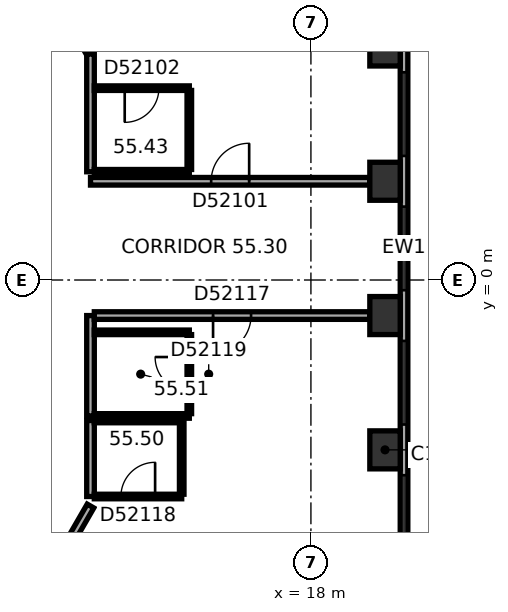
"""IFC4 building model, lengths in metres.
Left out: names, types, materials, properties, quantities, classifications, styles, units other than length and angle.
Written with IfcOpenShell. Run it as: python <this file> out.ifc"""

import sys

from ifc_helpers import new_model, si_unit, direction, frame, frame_2d, origin, origin_2d, place, context, subcontext, project, spatial, rectangle, extrude, element, fill, save


model = new_model("IFC4")
c1 = context("Model", 3, precision=1e-05, world=origin(), true_north=direction((0.0, 1.0)))
c2 = subcontext(c1, "Body", "Model", "MODEL_VIEW")
j1 = project(units=[si_unit("LENGTHUNIT", "METRE"), si_unit("PLANEANGLEUNIT", "RADIAN")], contexts=[c1])
p1 = place(None, origin())
s1 = spatial("IfcSite", under=j1, at=p1, CompositionType="ELEMENT")
p2 = place(p1, origin())
s2 = spatial("IfcBuilding", under=s1, at=p2, CompositionType="ELEMENT")
p3 = place(p2, frame((0.0, 0.0, 225.4)))
s3 = spatial("IfcBuildingStorey", under=s2, at=p3, CompositionType="ELEMENT", Elevation=225.4)
for number, where, z_axis, x_axis in (
    (1, (19.95, -4.469, 0.0), (0.0, 0.0, 1.0), (0.0, 1.0, 0.0)),
    (2, (19.95, -0.936, 0.0), (0.0, 0.0, 1.0), (0.0, 1.0, 0.0)),
    (3, (19.95, 2.598, 0.0), (0.0, 0.0, 1.0), (0.0, 1.0, 0.0)),
    (4, (19.95, 6.132, 0.0), (0.0, 0.0, 1.0), (0.0, 1.0, 0.0)),
):
    element("IfcColumn", number, at=place(p3, frame(where, z_axis=z_axis, x_axis=x_axis)), inside=s3, PredefinedType="COLUMN", context=c2, shape_type="SweptSolid", body=[
        extrude(rectangle(XDim=1.0, YDim=0.8, at=origin_2d()), origin(), (0.0, 0.0, 1.0), 3.7),
    ])
p4 = place(p3, frame((20.45, -8.59, 0.0), z_axis=(0.0, 0.0, 1.0), x_axis=(0.0, 1.0, 0.0)))
e5 = element("IfcWall", 5, at=p4, inside=s3, PredefinedType="STANDARD", context=c2, shape_type="SweptSolid", body=[
    extrude(rectangle(XDim=18.841, YDim=0.2, at=frame_2d((9.421, 0.0))), origin(), (0.0, 0.0, 1.0), 3.7),
])
p5 = place(p4, frame((1.254, 0.0, 0.9)))
e6 = element("IfcOpeningElement", 6, at=p5, cuts=e5, PredefinedType="OPENING", context=c2, shape_type="SweptSolid", body=[
    extrude(rectangle(XDim=2.2, YDim=2.0, at=frame_2d((1.1, 1.0))), frame((0.0, 0.11, 0.0), z_axis=(0.0, -1.0, 0.0), x_axis=(1.0, 0.0, 0.0)), (0.0, 0.0, 1.0), 0.22),
])
p6 = place(p4, frame((4.788, 0.0, 0.9)))
e7 = element("IfcOpeningElement", 7, at=p6, cuts=e5, PredefinedType="OPENING", context=c2, shape_type="SweptSolid", body=[
    extrude(rectangle(XDim=2.2, YDim=2.0, at=frame_2d((1.1, 1.0))), frame((0.0, 0.11, 0.0), z_axis=(0.0, -1.0, 0.0), x_axis=(1.0, 0.0, 0.0)), (0.0, 0.0, 1.0), 0.22),
])
p7 = place(p4, frame((8.322, 0.0, 0.9)))
e8 = element("IfcOpeningElement", 8, at=p7, cuts=e5, PredefinedType="OPENING", context=c2, shape_type="SweptSolid", body=[
    extrude(rectangle(XDim=2.2, YDim=2.0, at=frame_2d((1.1, 1.0))), frame((0.0, 0.11, 0.0), z_axis=(0.0, -1.0, 0.0), x_axis=(1.0, 0.0, 0.0)), (0.0, 0.0, 1.0), 0.22),
])
p8 = place(p4, frame((11.855, 0.0, 0.9)))
e9 = element("IfcOpeningElement", 9, at=p8, cuts=e5, PredefinedType="OPENING", context=c2, shape_type="SweptSolid", body=[
    extrude(rectangle(XDim=2.2, YDim=2.0, at=frame_2d((1.1, 1.0))), frame((0.0, 0.11, 0.0), z_axis=(0.0, -1.0, 0.0), x_axis=(1.0, 0.0, 0.0)), (0.0, 0.0, 1.0), 0.22),
])
p9 = place(p4, frame((15.389, 0.0, 0.9)))
e10 = element("IfcOpeningElement", 10, at=p9, cuts=e5, PredefinedType="OPENING", context=c2, shape_type="SweptSolid", body=[
    extrude(rectangle(XDim=2.2, YDim=2.0, at=frame_2d((1.1, 1.0))), frame((0.0, 0.11, 0.0), z_axis=(0.0, -1.0, 0.0), x_axis=(1.0, 0.0, 0.0)), (0.0, 0.0, 1.0), 0.22),
])
p10 = place(p3, frame((11.27, -7.558, 0.0), z_axis=(0.0, 0.0, 1.0), x_axis=(0.499964847546, 0.866045698112, 0.0)))
e11 = element("IfcWall", 11, at=p10, inside=s3, PredefinedType="PARTITIONING", context=c2, shape_type="SweptSolid", body=[
    extrude(rectangle(XDim=1.86, YDim=0.2, at=frame_2d((0.93, 0.0))), origin(), (0.0, 0.0, 1.0), 3.42),
])
p11 = place(p3, frame((12.18, 5.981, 0.0), z_axis=(0.0, 0.0, 1.0), x_axis=(-0.499904359745, 0.86608061467, 0.0)))
e12 = element("IfcWall", 12, at=p11, inside=s3, PredefinedType="PARTITIONING", context=c2, shape_type="SweptSolid", body=[
    extrude(rectangle(XDim=1.82, YDim=0.2, at=frame_2d((0.91, 0.0))), origin(), (0.0, 0.0, 1.0), 3.42),
])
p12 = place(p3, frame((12.2, -5.697, 0.0), z_axis=(0.0, 0.0, 1.0), x_axis=(0.0, 1.0, 0.0)))
e13 = element("IfcWall", 13, at=p12, inside=s3, PredefinedType="PARTITIONING", context=c2, shape_type="SweptSolid", body=[
    extrude(rectangle(XDim=2.0, YDim=0.2, at=frame_2d((1.0, 0.0))), origin(), (0.0, 0.0, 1.0), 3.42),
])
p13 = place(p3, frame((12.2, -3.577, 0.0), z_axis=(0.0, 0.0, 1.0), x_axis=(0.0, 1.0, 0.0)))
e14 = element("IfcWall", 14, at=p13, inside=s3, PredefinedType="PARTITIONING", context=c2, shape_type="SweptSolid", body=[
    extrude(rectangle(XDim=2.641, YDim=0.2, at=frame_2d((1.321, 0.0))), origin(), (0.0, 0.0, 1.0), 3.42),
])
p14 = place(p3, frame((12.2, 2.848, 0.0), z_axis=(0.0, 0.0, 1.0), x_axis=(0.0, 1.0, 0.0)))
e15 = element("IfcWall", 15, at=p14, inside=s3, PredefinedType="PARTITIONING", context=c2, shape_type="SweptSolid", body=[
    extrude(rectangle(XDim=3.099, YDim=0.2, at=frame_2d((1.549, 0.0))), origin(), (0.0, 0.0, 1.0), 3.42),
])
p15 = place(p3, frame((12.3, -3.697, 0.0), z_axis=(0.0, 0.0, 1.0), x_axis=(1.0, 0.0, 0.0)))
e16 = element("IfcWall", 16, at=p15, inside=s3, PredefinedType="PARTITIONING", context=c2, shape_type="SweptSolid", body=[
    extrude(rectangle(XDim=2.3, YDim=0.12, at=frame_2d((1.15, 0.0))), origin(), (0.0, 0.0, 1.0), 3.42),
])
p16 = place(p3, frame((12.3, -1.377, 0.0), z_axis=(0.0, 0.0, 1.0), x_axis=(1.0, 0.0, 0.0)))
e17 = element("IfcWall", 17, at=p16, inside=s3, PredefinedType="PARTITIONING", context=c2, shape_type="SweptSolid", body=[
    extrude(rectangle(XDim=2.5, YDim=0.12, at=frame_2d((1.25, 0.0))), origin(), (0.0, 0.0, 1.0), 3.42),
])
p17 = place(p3, frame((12.3, -0.936, 0.0), z_axis=(0.0, 0.0, 1.0), x_axis=(1.0, 0.0, 0.0)))
e18 = element("IfcWall", 18, at=p17, inside=s3, PredefinedType="PARTITIONING", context=c2, shape_type="SweptSolid", body=[
    extrude(rectangle(XDim=7.25, YDim=0.2, at=frame_2d((3.625, 0.0))), origin(), (0.0, 0.0, 1.0), 2.87),
])
p18 = place(p17, frame((3.125, 0.0, 0.0)))
e19 = element("IfcOpeningElement", 19, at=p18, cuts=e18, PredefinedType="OPENING", context=c2, shape_type="SweptSolid", body=[
    extrude(rectangle(XDim=1.0, YDim=2.1, at=frame_2d((0.5, 1.05))), frame((0.0, 0.11, 0.0), z_axis=(0.0, -1.0, 0.0), x_axis=(1.0, 0.0, 0.0)), (0.0, 0.0, 1.0), 0.22),
])
p19 = place(p3, frame((12.3, 5.048, 0.0), z_axis=(0.0, 0.0, 1.0), x_axis=(1.0, 0.0, 0.0)))
e20 = element("IfcWall", 20, at=p19, inside=s3, PredefinedType="PARTITIONING", context=c2, shape_type="SweptSolid", body=[
    extrude(rectangle(XDim=2.5, YDim=0.12, at=frame_2d((1.25, 0.0))), origin(), (0.0, 0.0, 1.0), 3.42),
])
p20 = place(p19, frame((0.8, 0.0, 0.0)))
e21 = element("IfcOpeningElement", 21, at=p20, cuts=e20, PredefinedType="OPENING", context=c2, shape_type="SweptSolid", body=[
    extrude(rectangle(XDim=0.9, YDim=2.1, at=frame_2d((0.45, 1.05))), frame((0.0, 0.07, 0.0), z_axis=(0.0, -1.0, 0.0), x_axis=(1.0, 0.0, 0.0)), (0.0, 0.0, 1.0), 0.14),
])
p21 = place(p3, frame((14.6, -5.697, 0.0), z_axis=(0.0, 0.0, 1.0), x_axis=(-1.0, 0.0, 0.0)))
e22 = element("IfcWall", 22, at=p21, inside=s3, PredefinedType="PARTITIONING", context=c2, shape_type="SweptSolid", body=[
    extrude(rectangle(XDim=2.3, YDim=0.12, at=frame_2d((1.15, 0.0))), origin(), (0.0, 0.0, 1.0), 3.42),
])
p22 = place(p21, frame((0.7, 0.0, 0.0)))
e23 = element("IfcOpeningElement", 23, at=p22, cuts=e22, PredefinedType="OPENING", context=c2, shape_type="SweptSolid", body=[
    extrude(rectangle(XDim=0.9, YDim=2.1, at=frame_2d((0.45, 1.05))), frame((0.0, 0.07, 0.0), z_axis=(0.0, -1.0, 0.0), x_axis=(1.0, 0.0, 0.0)), (0.0, 0.0, 1.0), 0.14),
])
p23 = place(p3, frame((14.6, -3.757, 0.0), z_axis=(0.0, 0.0, 1.0), x_axis=(0.0, -1.0, 0.0)))
e24 = element("IfcWall", 24, at=p23, inside=s3, PredefinedType="PARTITIONING", context=c2, shape_type="SweptSolid", body=[
    extrude(rectangle(XDim=1.88, YDim=0.12, at=frame_2d((0.94, 0.0))), origin(), (0.0, 0.0, 1.0), 3.42),
])
p24 = place(p3, frame((14.8, -3.577, 0.0), z_axis=(0.0, 0.0, 1.0), x_axis=(-1.0, 0.0, 0.0)))
e25 = element("IfcWall", 25, at=p24, inside=s3, PredefinedType="PARTITIONING", context=c2, shape_type="SweptSolid", body=[
    extrude(rectangle(XDim=2.5, YDim=0.12, at=frame_2d((1.25, 0.0))), origin(), (0.0, 0.0, 1.0), 3.42),
])
p25 = place(p3, frame((14.8, -1.437, 0.0), z_axis=(0.0, 0.0, 1.0), x_axis=(0.0, -1.0, 0.0)))
e26 = element("IfcWall", 26, at=p25, inside=s3, PredefinedType="PARTITIONING", context=c2, shape_type="SweptSolid", body=[
    extrude(rectangle(XDim=2.08, YDim=0.12, at=frame_2d((1.04, 0.0))), origin(), (0.0, 0.0, 1.0), 3.42),
])
p26 = place(p25, frame((0.59, 0.0, 0.0)))
e27 = element("IfcOpeningElement", 27, at=p26, cuts=e26, PredefinedType="OPENING", context=c2, shape_type="SweptSolid", body=[
    extrude(rectangle(XDim=0.9, YDim=2.1, at=frame_2d((0.45, 1.05))), frame((0.0, 0.07, 0.0), z_axis=(0.0, -1.0, 0.0), x_axis=(1.0, 0.0, 0.0)), (0.0, 0.0, 1.0), 0.14),
])
p27 = place(p3, frame((14.8, 2.848, 0.0), z_axis=(0.0, 0.0, 1.0), x_axis=(-1.0, 0.0, 0.0)))
e28 = element("IfcWall", 28, at=p27, inside=s3, PredefinedType="PARTITIONING", context=c2, shape_type="SweptSolid", body=[
    extrude(rectangle(XDim=2.5, YDim=0.12, at=frame_2d((1.25, 0.0))), origin(), (0.0, 0.0, 1.0), 3.42),
])
p28 = place(p3, frame((14.8, 4.988, 0.0), z_axis=(0.0, 0.0, 1.0), x_axis=(0.0, -1.0, 0.0)))
e29 = element("IfcWall", 29, at=p28, inside=s3, PredefinedType="PARTITIONING", context=c2, shape_type="SweptSolid", body=[
    extrude(rectangle(XDim=2.08, YDim=0.12, at=frame_2d((1.04, 0.0))), origin(), (0.0, 0.0, 1.0), 3.42),
])
p29 = place(p3, frame((19.55, 2.598, 0.0), z_axis=(0.0, 0.0, 1.0), x_axis=(-1.0, 0.0, 0.0)))
e30 = element("IfcWall", 30, at=p29, inside=s3, PredefinedType="PARTITIONING", context=c2, shape_type="SweptSolid", body=[
    extrude(rectangle(XDim=7.35, YDim=0.2, at=frame_2d((3.675, 0.0))), origin(), (0.0, 0.0, 1.0), 3.42),
])
p30 = place(p29, frame((3.175, 0.0, 0.0)))
e31 = element("IfcOpeningElement", 31, at=p30, cuts=e30, PredefinedType="OPENING", context=c2, shape_type="SweptSolid", body=[
    extrude(rectangle(XDim=1.0, YDim=2.1, at=frame_2d((0.5, 1.05))), frame((0.0, 0.11, 0.0), z_axis=(0.0, -1.0, 0.0), x_axis=(1.0, 0.0, 0.0)), (0.0, 0.0, 1.0), 0.22),
])
p31 = place(p5, origin())
e32 = element("IfcWindow", 32, at=p31, inside=s3, PartitioningType="SINGLE_PANEL", PredefinedType="WINDOW", context=c2, shape_type="SweptSolid", body=[
    extrude(rectangle(XDim=2.2, YDim=2.0, at=frame_2d((1.1, 1.0))), frame((0.0, 0.03, 0.0), z_axis=(0.0, -1.0, 0.0), x_axis=(1.0, 0.0, 0.0)), (0.0, 0.0, 1.0), 0.06),
])
fill(e6, e32)
p32 = place(p6, origin())
e33 = element("IfcWindow", 33, at=p32, inside=s3, PartitioningType="SINGLE_PANEL", PredefinedType="WINDOW", context=c2, shape_type="SweptSolid", body=[
    extrude(rectangle(XDim=2.2, YDim=2.0, at=frame_2d((1.1, 1.0))), frame((0.0, 0.03, 0.0), z_axis=(0.0, -1.0, 0.0), x_axis=(1.0, 0.0, 0.0)), (0.0, 0.0, 1.0), 0.06),
])
fill(e7, e33)
p33 = place(p7, origin())
e34 = element("IfcWindow", 34, at=p33, inside=s3, PartitioningType="SINGLE_PANEL", PredefinedType="WINDOW", context=c2, shape_type="SweptSolid", body=[
    extrude(rectangle(XDim=2.2, YDim=2.0, at=frame_2d((1.1, 1.0))), frame((0.0, 0.03, 0.0), z_axis=(0.0, -1.0, 0.0), x_axis=(1.0, 0.0, 0.0)), (0.0, 0.0, 1.0), 0.06),
])
fill(e8, e34)
p34 = place(p8, origin())
e35 = element("IfcWindow", 35, at=p34, inside=s3, PartitioningType="SINGLE_PANEL", PredefinedType="WINDOW", context=c2, shape_type="SweptSolid", body=[
    extrude(rectangle(XDim=2.2, YDim=2.0, at=frame_2d((1.1, 1.0))), frame((0.0, 0.03, 0.0), z_axis=(0.0, -1.0, 0.0), x_axis=(1.0, 0.0, 0.0)), (0.0, 0.0, 1.0), 0.06),
])
fill(e9, e35)
p35 = place(p30, origin())
e36 = element("IfcDoor", 36, at=p35, inside=s3, OperationType="SINGLE_SWING_LEFT", PredefinedType="DOOR", context=c2, shape_type="SweptSolid", body=[
    extrude(rectangle(XDim=1.0, YDim=2.1, at=frame_2d((0.5, 1.05))), frame((0.0, 0.025, 0.0), z_axis=(0.0, -1.0, 0.0), x_axis=(1.0, 0.0, 0.0)), (0.0, 0.0, 1.0), 0.05),
])
fill(e31, e36)
p36 = place(p20, origin())
e37 = element("IfcDoor", 37, at=p36, inside=s3, OperationType="SINGLE_SWING_LEFT", PredefinedType="DOOR", context=c2, shape_type="SweptSolid", body=[
    extrude(rectangle(XDim=0.9, YDim=2.1, at=frame_2d((0.45, 1.05))), frame((0.0, 0.025, 0.0), z_axis=(0.0, -1.0, 0.0), x_axis=(1.0, 0.0, 0.0)), (0.0, 0.0, 1.0), 0.05),
])
fill(e21, e37)
p37 = place(p18, origin())
e38 = element("IfcDoor", 38, at=p37, inside=s3, OperationType="SINGLE_SWING_LEFT", PredefinedType="DOOR", context=c2, shape_type="SweptSolid", body=[
    extrude(rectangle(XDim=1.0, YDim=2.1, at=frame_2d((0.5, 1.05))), frame((0.0, 0.025, 0.0), z_axis=(0.0, -1.0, 0.0), x_axis=(1.0, 0.0, 0.0)), (0.0, 0.0, 1.0), 0.05),
])
fill(e19, e38)
p38 = place(p22, origin())
e39 = element("IfcDoor", 39, at=p38, inside=s3, OperationType="SINGLE_SWING_LEFT", PredefinedType="DOOR", context=c2, shape_type="SweptSolid", body=[
    extrude(rectangle(XDim=0.9, YDim=2.1, at=frame_2d((0.45, 1.05))), frame((0.0, 0.025, 0.0), z_axis=(0.0, -1.0, 0.0), x_axis=(1.0, 0.0, 0.0)), (0.0, 0.0, 1.0), 0.05),
])
fill(e23, e39)
p39 = place(p26, origin())
e40 = element("IfcDoor", 40, at=p39, inside=s3, OperationType="SINGLE_SWING_LEFT", PredefinedType="DOOR", context=c2, shape_type="SweptSolid", body=[
    extrude(rectangle(XDim=0.9, YDim=2.1, at=frame_2d((0.45, 1.05))), frame((0.0, 0.025, 0.0), z_axis=(0.0, -1.0, 0.0), x_axis=(1.0, 0.0, 0.0)), (0.0, 0.0, 1.0), 0.05),
])
fill(e27, e40)
save(model, sys.argv[1])
